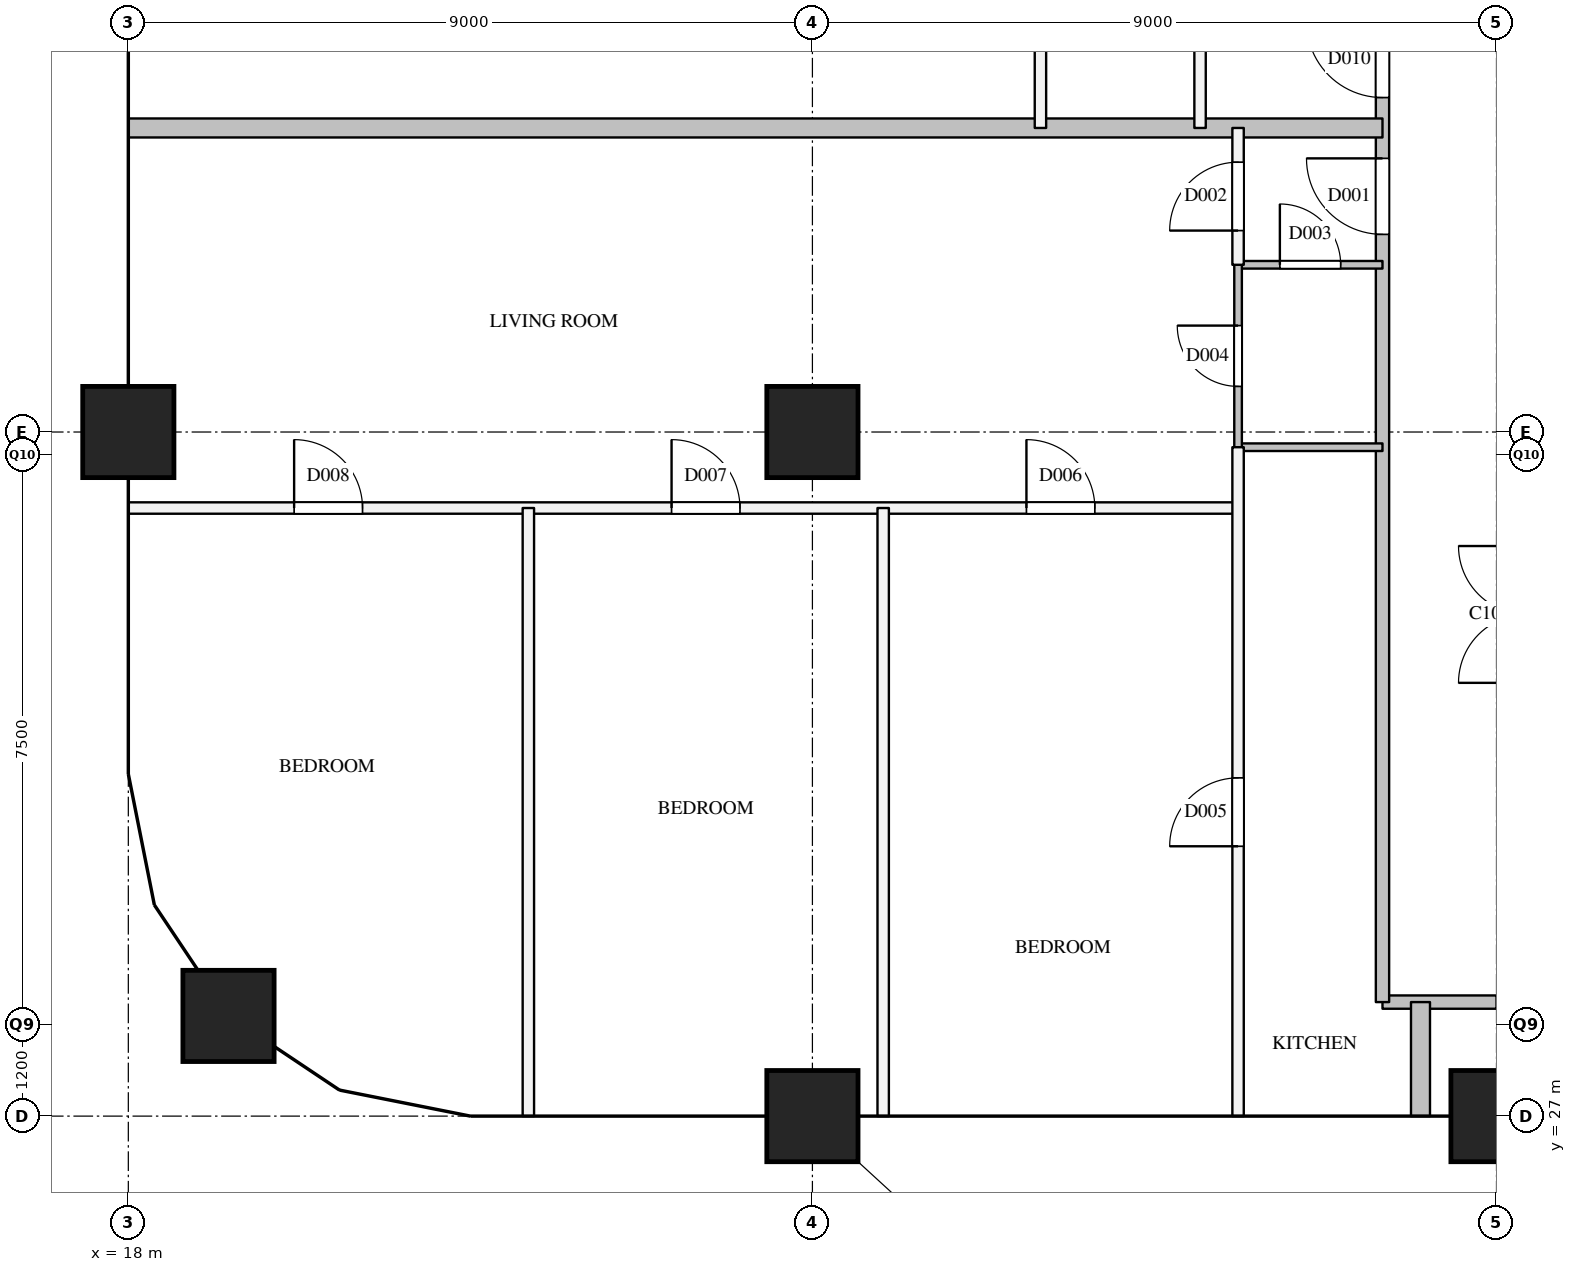
"""IFC4 building model, lengths in metres.
Left out: names, types, materials, properties, quantities, classifications, styles, units other than length and angle.
Written with IfcOpenShell. Run it as: python <this file> out.ifc"""

import sys

from ifc_helpers import new_model, si_unit, direction, frame, frame_2d, origin, origin_2d, place, context, subcontext, project, spatial, rectangle, extrude, element, fill, save


model = new_model("IFC4")
c1 = context("Model", 3, precision=1e-05, world=origin(), true_north=direction((0.0, 1.0)))
c2 = subcontext(c1, "Body", "Model", "MODEL_VIEW")
j1 = project(units=[si_unit("LENGTHUNIT", "METRE"), si_unit("PLANEANGLEUNIT", "RADIAN")], contexts=[c1])
p1 = place(None, origin())
s1 = spatial("IfcSite", under=j1, at=p1, CompositionType="ELEMENT")
p2 = place(p1, origin())
s2 = spatial("IfcBuilding", under=s1, at=p2, CompositionType="ELEMENT")
p3 = place(p2, frame((0.0, 0.0, 254.0)))
s3 = spatial("IfcBuildingStorey", under=s2, at=p3, CompositionType="ELEMENT", Elevation=254.0)
for number, where, z_axis, x_axis in (
    (1, (19.318, 28.318, 0.0), (0.0, 0.0, 1.0), (1.0, 0.0, 0.0)),
    (2, (18.0, 36.0, 0.0), (0.0, 0.0, 1.0), (1.0, 0.0, 0.0)),
    (3, (27.0, 27.0, 0.0), (0.0, 0.0, 1.0), (1.0, 0.0, 0.0)),
    (4, (27.0, 36.0, 0.0), (0.0, 0.0, 1.0), (1.0, 0.0, 0.0)),
    (5, (36.0, 27.0, 0.0), (0.0, 0.0, 1.0), (1.0, 0.0, 0.0)),
):
    element("IfcColumn", number, at=place(p3, frame(where, z_axis=z_axis, x_axis=x_axis)), inside=s3, PredefinedType="COLUMN", context=c2, shape_type="SweptSolid", body=[
        extrude(rectangle(XDim=1.2, YDim=1.2, at=origin_2d()), origin(), (0.0, 0.0, 1.0), 3.9),
    ])
p4 = place(p3, frame((34.5, 28.5, 0.0), z_axis=(0.0, 0.0, 1.0), x_axis=(1.0, 0.0, 0.0)))
e6 = element("IfcWall", 6, at=p4, inside=s3, PredefinedType="PARTITIONING", context=c2, shape_type="SweptSolid", body=[
    extrude(rectangle(XDim=1.5, YDim=0.175, at=frame_2d((0.75, 0.0))), origin(), (0.0, 0.0, 1.0), 3.6),
])
p5 = place(p3, frame((34.5, 28.5, 0.0), z_axis=(0.0, 0.0, 1.0), x_axis=(0.0, 1.0, 0.0)))
e7 = element("IfcWall", 7, at=p5, inside=s3, PredefinedType="PARTITIONING", context=c2, shape_type="SweptSolid", body=[
    extrude(rectangle(XDim=15.7, YDim=0.175, at=frame_2d((7.85, 0.0))), origin(), (0.0, 0.0, 1.0), 3.6),
])
p6 = place(p5, frame((10.1, 0.0, 0.0)))
e8 = element("IfcOpeningElement", 8, at=p6, cuts=e7, PredefinedType="OPENING", context=c2, shape_type="SweptSolid", body=[
    extrude(rectangle(XDim=1.0, YDim=2.1, at=frame_2d((0.5, 1.05))), frame((0.0, 0.097, 0.0), z_axis=(0.0, -1.0, 0.0), x_axis=(1.0, 0.0, 0.0)), (0.0, 0.0, 1.0), 0.195),
])
p7 = place(p5, frame((11.9, 0.0, 0.0)))
e9 = element("IfcOpeningElement", 9, at=p7, cuts=e7, PredefinedType="OPENING", context=c2, shape_type="SweptSolid", body=[
    extrude(rectangle(XDim=1.0, YDim=2.1, at=frame_2d((0.5, 1.05))), frame((0.0, 0.097, 0.0), z_axis=(0.0, -1.0, 0.0), x_axis=(1.0, 0.0, 0.0)), (0.0, 0.0, 1.0), 0.195),
])
p8 = place(p3, frame((18.0, 35.0, 0.0), z_axis=(0.0, 0.0, 1.0), x_axis=(1.0, 0.0, 0.0)))
e10 = element("IfcWall", 10, at=p8, inside=s3, PredefinedType="PARTITIONING", context=c2, shape_type="SweptSolid", body=[
    extrude(rectangle(XDim=14.6, YDim=0.15, at=frame_2d((7.3, 0.0))), origin(), (0.0, 0.0, 1.0), 2.6),
])
p9 = place(p8, frame((11.816, 0.0, 0.0)))
e11 = element("IfcOpeningElement", 11, at=p9, cuts=e10, PredefinedType="OPENING", context=c2, shape_type="SweptSolid", body=[
    extrude(rectangle(XDim=0.9, YDim=2.1, at=frame_2d((0.45, 1.05))), frame((0.0, 0.085, 0.0), z_axis=(0.0, -1.0, 0.0), x_axis=(1.0, 0.0, 0.0)), (0.0, 0.0, 1.0), 0.17),
])
p10 = place(p8, frame((7.147, 0.0, 0.0)))
e12 = element("IfcOpeningElement", 12, at=p10, cuts=e10, PredefinedType="OPENING", context=c2, shape_type="SweptSolid", body=[
    extrude(rectangle(XDim=0.9, YDim=2.1, at=frame_2d((0.45, 1.05))), frame((0.0, 0.085, 0.0), z_axis=(0.0, -1.0, 0.0), x_axis=(1.0, 0.0, 0.0)), (0.0, 0.0, 1.0), 0.17),
])
p11 = place(p8, frame((2.181, 0.0, 0.0)))
e13 = element("IfcOpeningElement", 13, at=p11, cuts=e10, PredefinedType="OPENING", context=c2, shape_type="SweptSolid", body=[
    extrude(rectangle(XDim=0.9, YDim=2.1, at=frame_2d((0.45, 1.05))), frame((0.0, 0.085, 0.0), z_axis=(0.0, -1.0, 0.0), x_axis=(1.0, 0.0, 0.0)), (0.0, 0.0, 1.0), 0.17),
])
for number, where, z_axis, x_axis in (
    (14, (23.263, 27.0, 0.0), (0.0, 0.0, 1.0), (0.0, 1.0, 0.0)),
    (15, (27.931, 27.0, 0.0), (0.0, 0.0, 1.0), (0.0, 1.0, 0.0)),
):
    element("IfcWall", number, at=place(p3, frame(where, z_axis=z_axis, x_axis=x_axis)), inside=s3, PredefinedType="PARTITIONING", context=c2, shape_type="SweptSolid", body=[
        extrude(rectangle(XDim=8.0, YDim=0.15, at=frame_2d((4.0, 0.0))), origin(), (0.0, 0.0, 1.0), 2.6),
    ])
p12 = place(p3, frame((30.0, 40.0, 0.0), z_axis=(0.0, 0.0, 1.0), x_axis=(0.0, 1.0, 0.0)))
e16 = element("IfcWall", 16, at=p12, inside=s3, PredefinedType="PARTITIONING", context=c2, shape_type="SweptSolid", body=[
    extrude(rectangle(XDim=5.0, YDim=0.15, at=frame_2d((2.5, 0.0))), origin(), (0.0, 0.0, 1.0), 3.6),
])
p13 = place(p12, frame((2.05, 0.0, 0.0)))
e17 = element("IfcOpeningElement", 17, at=p13, cuts=e16, PredefinedType="OPENING", context=c2, shape_type="SweptSolid", body=[
    extrude(rectangle(XDim=0.9, YDim=2.1, at=frame_2d((0.45, 1.05))), frame((0.0, 0.085, 0.0), z_axis=(0.0, -1.0, 0.0), x_axis=(1.0, 0.0, 0.0)), (0.0, 0.0, 1.0), 0.17),
])
p14 = place(p3, frame((32.1, 40.0, 0.0), z_axis=(0.0, 0.0, 1.0), x_axis=(0.0, 1.0, 0.0)))
e18 = element("IfcWall", 18, at=p14, inside=s3, PredefinedType="PARTITIONING", context=c2, shape_type="SweptSolid", body=[
    extrude(rectangle(XDim=1.8, YDim=0.15, at=frame_2d((0.9, 0.0))), origin(), (0.0, 0.0, 1.0), 3.6),
])
p15 = place(p3, frame((32.6, 27.0, 0.0), z_axis=(0.0, 0.0, 1.0), x_axis=(0.0, 1.0, 0.0)))
e19 = element("IfcWall", 19, at=p15, inside=s3, PredefinedType="PARTITIONING", context=c2, shape_type="SweptSolid", body=[
    extrude(rectangle(XDim=8.8, YDim=0.15, at=frame_2d((4.4, 0.0))), origin(), (0.0, 0.0, 1.0), 2.6),
])
p16 = place(p15, frame((3.55, 0.0, 0.0)))
e20 = element("IfcOpeningElement", 20, at=p16, cuts=e19, PredefinedType="OPENING", context=c2, shape_type="SweptSolid", body=[
    extrude(rectangle(XDim=0.9, YDim=2.1, at=frame_2d((0.45, 1.05))), frame((0.0, 0.085, 0.0), z_axis=(0.0, -1.0, 0.0), x_axis=(1.0, 0.0, 0.0)), (0.0, 0.0, 1.0), 0.17),
])
p17 = place(p3, frame((32.6, 38.2, 0.0), z_axis=(0.0, 0.0, 1.0), x_axis=(0.0, 1.0, 0.0)))
e21 = element("IfcWall", 21, at=p17, inside=s3, PredefinedType="PARTITIONING", context=c2, shape_type="SweptSolid", body=[
    extrude(rectangle(XDim=1.8, YDim=0.15, at=frame_2d((0.9, 0.0))), origin(), (0.0, 0.0, 1.0), 3.6),
])
p18 = place(p17, frame((0.45, 0.0, 0.0)))
e22 = element("IfcOpeningElement", 22, at=p18, cuts=e21, PredefinedType="OPENING", context=c2, shape_type="SweptSolid", body=[
    extrude(rectangle(XDim=0.9, YDim=2.1, at=frame_2d((0.45, 1.05))), frame((0.0, 0.085, 0.0), z_axis=(0.0, -1.0, 0.0), x_axis=(1.0, 0.0, 0.0)), (0.0, 0.0, 1.0), 0.17),
])
p19 = place(p3, frame((18.0, 40.0, 0.0), z_axis=(0.0, 0.0, 1.0), x_axis=(1.0, 0.0, 0.0)))
e23 = element("IfcWall", 23, at=p19, inside=s3, PredefinedType="PARTITIONING", context=c2, shape_type="SweptSolid", body=[
    extrude(rectangle(XDim=16.5, YDim=0.25, at=frame_2d((8.25, 0.0))), origin(), (0.0, 0.0, 1.0), 2.6),
])
p20 = place(p3, frame((35.0, 27.0, 0.0), z_axis=(0.0, 0.0, 1.0), x_axis=(0.0, 1.0, 0.0)))
e24 = element("IfcWall", 24, at=p20, inside=s3, PredefinedType="PARTITIONING", context=c2, shape_type="SweptSolid", body=[
    extrude(rectangle(XDim=1.5, YDim=0.25, at=frame_2d((0.75, 0.0))), origin(), (0.0, 0.0, 1.0), 2.6),
])
p21 = place(p3, frame((32.6, 35.8, 0.0), z_axis=(0.0, 0.0, 1.0), x_axis=(1.0, 0.0, 0.0)))
e25 = element("IfcWall", 25, at=p21, inside=s3, PredefinedType="PARTITIONING", context=c2, shape_type="SweptSolid", body=[
    extrude(rectangle(XDim=1.9, YDim=0.1, at=frame_2d((0.95, 0.0))), origin(), (0.0, 0.0, 1.0), 3.6),
])
p22 = place(p3, frame((32.6, 38.2, 0.0), z_axis=(0.0, 0.0, 1.0), x_axis=(1.0, 0.0, 0.0)))
e26 = element("IfcWall", 26, at=p22, inside=s3, PredefinedType="PARTITIONING", context=c2, shape_type="SweptSolid", body=[
    extrude(rectangle(XDim=1.9, YDim=0.1, at=frame_2d((0.95, 0.0))), origin(), (0.0, 0.0, 1.0), 3.6),
])
p23 = place(p22, frame((0.55, 0.0, 0.0)))
e27 = element("IfcOpeningElement", 27, at=p23, cuts=e26, PredefinedType="OPENING", context=c2, shape_type="SweptSolid", body=[
    extrude(rectangle(XDim=0.8, YDim=2.1, at=frame_2d((0.4, 1.05))), frame((0.0, 0.06, 0.0), z_axis=(0.0, -1.0, 0.0), x_axis=(1.0, 0.0, 0.0)), (0.0, 0.0, 1.0), 0.12),
])
p24 = place(p3, frame((32.6, 35.8, 0.0), z_axis=(0.0, 0.0, 1.0), x_axis=(0.0, 1.0, 0.0)))
e28 = element("IfcWall", 28, at=p24, inside=s3, PredefinedType="PARTITIONING", context=c2, shape_type="SweptSolid", body=[
    extrude(rectangle(XDim=2.4, YDim=0.1, at=frame_2d((1.2, 0.0))), origin(), (0.0, 0.0, 1.0), 3.6),
])
p25 = place(p24, frame((0.8, 0.0, 0.0)))
e29 = element("IfcOpeningElement", 29, at=p25, cuts=e28, PredefinedType="OPENING", context=c2, shape_type="SweptSolid", body=[
    extrude(rectangle(XDim=0.8, YDim=2.1, at=frame_2d((0.4, 1.05))), frame((0.0, 0.06, 0.0), z_axis=(0.0, -1.0, 0.0), x_axis=(1.0, 0.0, 0.0)), (0.0, 0.0, 1.0), 0.12),
])
p26 = place(p6, origin())
e30 = element("IfcDoor", 30, at=p26, inside=s3, OperationType="SINGLE_SWING_RIGHT", PredefinedType="DOOR", context=c2, shape_type="SweptSolid", body=[
    extrude(rectangle(XDim=1.0, YDim=2.1, at=frame_2d((0.5, 1.05))), frame((0.0, 0.025, 0.0), z_axis=(0.0, -1.0, 0.0), x_axis=(1.0, 0.0, 0.0)), (0.0, 0.0, 1.0), 0.05),
])
fill(e8, e30)
p27 = place(p18, origin())
e31 = element("IfcDoor", 31, at=p27, inside=s3, OperationType="SINGLE_SWING_LEFT", PredefinedType="DOOR", context=c2, shape_type="SweptSolid", body=[
    extrude(rectangle(XDim=0.9, YDim=2.1, at=frame_2d((0.45, 1.05))), frame((0.0, 0.025, 0.0), z_axis=(0.0, -1.0, 0.0), x_axis=(1.0, 0.0, 0.0)), (0.0, 0.0, 1.0), 0.05),
])
fill(e22, e31)
p28 = place(p23, origin())
e32 = element("IfcDoor", 32, at=p28, inside=s3, OperationType="SINGLE_SWING_LEFT", PredefinedType="DOOR", context=c2, shape_type="SweptSolid", body=[
    extrude(rectangle(XDim=0.8, YDim=2.1, at=frame_2d((0.4, 1.05))), frame((0.0, 0.025, 0.0), z_axis=(0.0, -1.0, 0.0), x_axis=(1.0, 0.0, 0.0)), (0.0, 0.0, 1.0), 0.05),
])
fill(e27, e32)
p29 = place(p25, origin())
e33 = element("IfcDoor", 33, at=p29, inside=s3, OperationType="SINGLE_SWING_RIGHT", PredefinedType="DOOR", context=c2, shape_type="SweptSolid", body=[
    extrude(rectangle(XDim=0.8, YDim=2.1, at=frame_2d((0.4, 1.05))), frame((0.0, 0.025, 0.0), z_axis=(0.0, -1.0, 0.0), x_axis=(1.0, 0.0, 0.0)), (0.0, 0.0, 1.0), 0.05),
])
fill(e29, e33)
p30 = place(p16, origin())
e34 = element("IfcDoor", 34, at=p30, inside=s3, OperationType="SINGLE_SWING_LEFT", PredefinedType="DOOR", context=c2, shape_type="SweptSolid", body=[
    extrude(rectangle(XDim=0.9, YDim=2.1, at=frame_2d((0.45, 1.05))), frame((0.0, 0.025, 0.0), z_axis=(0.0, -1.0, 0.0), x_axis=(1.0, 0.0, 0.0)), (0.0, 0.0, 1.0), 0.05),
])
fill(e20, e34)
p31 = place(p9, origin())
e35 = element("IfcDoor", 35, at=p31, inside=s3, OperationType="SINGLE_SWING_LEFT", PredefinedType="DOOR", context=c2, shape_type="SweptSolid", body=[
    extrude(rectangle(XDim=0.9, YDim=2.1, at=frame_2d((0.45, 1.05))), frame((0.0, 0.025, 0.0), z_axis=(0.0, -1.0, 0.0), x_axis=(1.0, 0.0, 0.0)), (0.0, 0.0, 1.0), 0.05),
])
fill(e11, e35)
p32 = place(p10, origin())
e36 = element("IfcDoor", 36, at=p32, inside=s3, OperationType="SINGLE_SWING_LEFT", PredefinedType="DOOR", context=c2, shape_type="SweptSolid", body=[
    extrude(rectangle(XDim=0.9, YDim=2.1, at=frame_2d((0.45, 1.05))), frame((0.0, 0.025, 0.0), z_axis=(0.0, -1.0, 0.0), x_axis=(1.0, 0.0, 0.0)), (0.0, 0.0, 1.0), 0.05),
])
fill(e12, e36)
p33 = place(p11, origin())
e37 = element("IfcDoor", 37, at=p33, inside=s3, OperationType="SINGLE_SWING_LEFT", PredefinedType="DOOR", context=c2, shape_type="SweptSolid", body=[
    extrude(rectangle(XDim=0.9, YDim=2.1, at=frame_2d((0.45, 1.05))), frame((0.0, 0.025, 0.0), z_axis=(0.0, -1.0, 0.0), x_axis=(1.0, 0.0, 0.0)), (0.0, 0.0, 1.0), 0.05),
])
fill(e13, e37)
p34 = place(p7, origin())
e38 = element("IfcDoor", 38, at=p34, inside=s3, OperationType="SINGLE_SWING_RIGHT", PredefinedType="DOOR", context=c2, shape_type="SweptSolid", body=[
    extrude(rectangle(XDim=1.0, YDim=2.1, at=frame_2d((0.5, 1.05))), frame((0.0, 0.025, 0.0), z_axis=(0.0, -1.0, 0.0), x_axis=(1.0, 0.0, 0.0)), (0.0, 0.0, 1.0), 0.05),
])
fill(e9, e38)
save(model, sys.argv[1])
